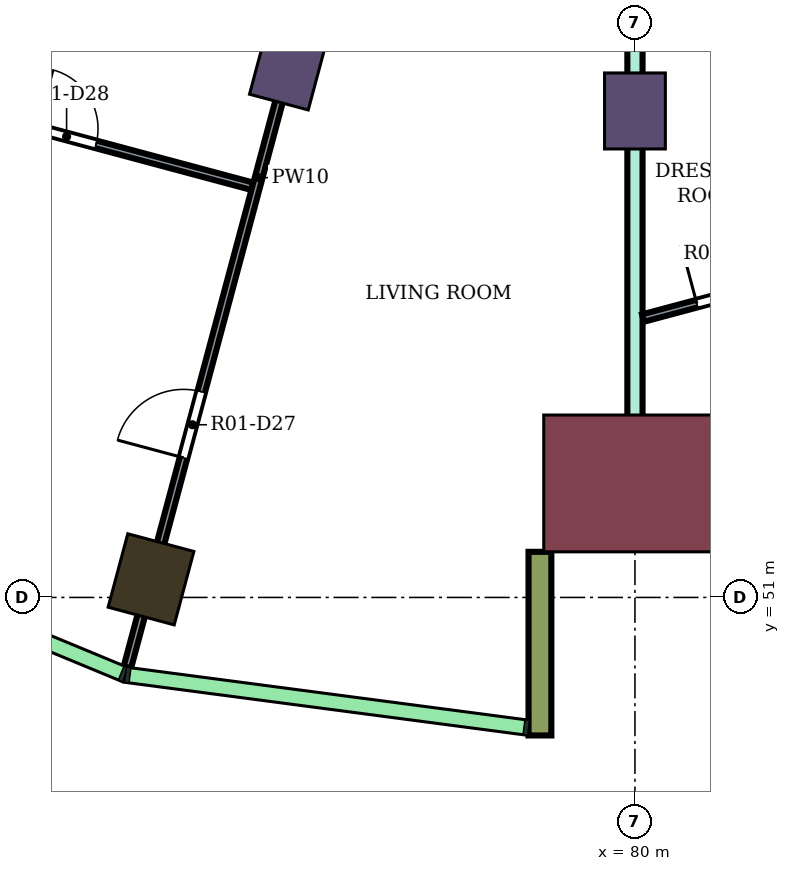
"""IFC4 building model, lengths in metres.
Left out: names, types, materials, properties, quantities, classifications, styles, units other than length and angle.
Written with IfcOpenShell. Run it as: python <this file> out.ifc"""

import sys

from ifc_helpers import new_model, si_unit, direction, frame, frame_2d, origin, origin_2d, place, context, subcontext, project, spatial, rectangle, extrude, element, fill, save


model = new_model("IFC4")
c1 = context("Model", 3, precision=1e-05, world=origin(), true_north=direction((0.0, 1.0)))
c2 = subcontext(c1, "Body", "Model", "MODEL_VIEW")
j1 = project(units=[si_unit("LENGTHUNIT", "METRE"), si_unit("PLANEANGLEUNIT", "RADIAN")], contexts=[c1])
p1 = place(None, origin())
s1 = spatial("IfcSite", under=j1, at=p1, CompositionType="ELEMENT")
p2 = place(p1, origin())
s2 = spatial("IfcBuilding", under=s1, at=p2, CompositionType="ELEMENT")
p3 = place(p2, frame((0.0, 0.0, 157.7)))
s3 = spatial("IfcBuildingStorey", under=s2, at=p3, CompositionType="ELEMENT", Elevation=157.7)
p4 = place(p3, frame((73.633, 51.238, 0.0), z_axis=(0.0, 0.0, 1.0), x_axis=(-0.258819045103, -0.965925826289, 0.0)))
e1 = element("IfcColumn", 1, at=p4, inside=s3, PredefinedType="COLUMN", context=c2, shape_type="SweptSolid", body=[
    extrude(rectangle(XDim=1.0, YDim=0.9, at=origin_2d()), origin(), (0.0, 0.0, 1.0), 4.1),
])
for number, where, z_axis, x_axis in (
    (2, (75.445, 58.0, 0.0), (0.0, 0.0, 1.0), (-0.259, -0.966, 0.0)),
    (3, (80.0, 57.4, 0.0), (0.0, 0.0, 1.0), (0.0, -1.0, 0.0)),
):
    element("IfcColumn", number, at=place(p3, frame(where, z_axis=z_axis, x_axis=x_axis)), inside=s3, PredefinedType="COLUMN", context=c2, shape_type="SweptSolid", body=[
        extrude(rectangle(XDim=1.0, YDim=0.8, at=origin_2d()), origin(), (0.0, 0.0, 1.0), 4.1),
    ])
p5 = place(p3, frame((80.0, 52.5, 0.0), z_axis=(0.0, 0.0, 1.0), x_axis=(0.0, -1.0, 0.0)))
e4 = element("IfcColumn", 4, at=p5, inside=s3, PredefinedType="COLUMN", context=c2, shape_type="SweptSolid", body=[
    extrude(rectangle(XDim=1.8, YDim=2.4, at=origin_2d()), origin(), (0.0, 0.0, 1.0), 4.1),
])
p6 = place(p3, frame((78.75, 51.6, 0.0), z_axis=(0.0, 0.0, 1.0), x_axis=(0.0, -1.0, 0.0)))
e5 = element("IfcWall", 5, at=p6, inside=s3, PredefinedType="NOTDEFINED", context=c2, shape_type="SweptSolid", body=[
    extrude(rectangle(XDim=2.416, YDim=0.3, at=frame_2d((1.208, 0.0))), origin(), (0.0, 0.0, 1.0), 4.1),
])
p7 = place(p3, frame((80.0, 51.8, 0.0), z_axis=(0.0, 0.0, 1.0), x_axis=(0.0, 1.0, 0.0)))
e6 = element("IfcWall", 6, at=p7, inside=s3, PredefinedType="PARTITIONING", context=c2, shape_type="SweptSolid", body=[
    extrude(rectangle(XDim=10.314, YDim=0.2, at=frame_2d((5.157, 0.0))), origin(), (0.0, 0.0, 1.0), 3.65),
])
p8 = place(p3, frame((67.101, 52.659, 0.0), z_axis=(0.0, 0.0, 1.0), x_axis=(0.499985055897, 0.866034031594, 0.0)))
e7 = element("IfcWall", 7, at=p8, inside=s3, PredefinedType="PARTITIONING", context=c2, shape_type="SweptSolid", body=[
    extrude(rectangle(XDim=12.876, YDim=0.1, at=frame_2d((6.438, 0.0))), origin(), (0.0, 0.0, 1.0), 3.65),
])
p9 = place(p8, frame((2.504, 0.0, 0.0)))
e8 = element("IfcOpeningElement", 8, at=p9, cuts=e7, PredefinedType="OPENING", context=c2, shape_type="SweptSolid", body=[
    extrude(rectangle(XDim=0.9, YDim=2.1, at=frame_2d((0.45, 1.05))), frame((0.0, 0.06, 0.0), z_axis=(0.0, -1.0, 0.0), x_axis=(1.0, 0.0, 0.0)), (0.0, 0.0, 1.0), 0.12),
])
p10 = place(p3, frame((70.088, 57.717, 0.0), z_axis=(0.0, 0.0, 1.0), x_axis=(0.965906836082, -0.258889907124, 0.0)))
e9 = element("IfcWall", 9, at=p10, inside=s3, PredefinedType="PARTITIONING", context=c2, shape_type="SweptSolid", body=[
    extrude(rectangle(XDim=5.051, YDim=0.1, at=frame_2d((2.525, 0.0))), origin(), (0.0, 0.0, 1.0), 3.65),
])
p11 = place(p10, frame((2.121, 0.0, 0.0)))
e10 = element("IfcOpeningElement", 10, at=p11, cuts=e9, PredefinedType="OPENING", context=c2, shape_type="SweptSolid", body=[
    extrude(rectangle(XDim=0.8, YDim=2.1, at=frame_2d((0.4, 1.05))), frame((0.0, 0.06, 0.0), z_axis=(0.0, -1.0, 0.0), x_axis=(1.0, 0.0, 0.0)), (0.0, 0.0, 1.0), 0.12),
])
p12 = place(p3, frame((73.322, 50.081, 0.0), z_axis=(0.0, 0.0, 1.0), x_axis=(0.258982801816, 0.965881932931, 0.0)))
e11 = element("IfcWall", 11, at=p12, inside=s3, PredefinedType="PARTITIONING", context=c2, shape_type="SweptSolid", body=[
    extrude(rectangle(XDim=13.338, YDim=0.1, at=frame_2d((6.669, 0.0))), origin(), (0.0, 0.0, 1.0), 3.65),
])
p13 = place(p12, frame((2.854, 0.0, 0.0)))
e12 = element("IfcOpeningElement", 12, at=p13, cuts=e11, PredefinedType="OPENING", context=c2, shape_type="SweptSolid", body=[
    extrude(rectangle(XDim=0.9, YDim=2.1, at=frame_2d((0.45, 1.05))), frame((0.0, 0.06, 0.0), z_axis=(0.0, -1.0, 0.0), x_axis=(1.0, 0.0, 0.0)), (0.0, 0.0, 1.0), 0.12),
])
p14 = place(p12, frame((10.528, 0.0, 0.0)))
e13 = element("IfcOpeningElement", 13, at=p14, cuts=e11, PredefinedType="OPENING", context=c2, shape_type="SweptSolid", body=[
    extrude(rectangle(XDim=0.8, YDim=2.1, at=frame_2d((0.4, 1.05))), frame((0.0, 0.06, 0.0), z_axis=(0.0, -1.0, 0.0), x_axis=(1.0, 0.0, 0.0)), (0.0, 0.0, 1.0), 0.12),
])
p15 = place(p3, frame((80.106, 54.676, 0.0), z_axis=(0.0, 0.0, 1.0), x_axis=(0.965976901679, 0.258628353863, 0.0)))
e14 = element("IfcWall", 14, at=p15, inside=s3, PredefinedType="PARTITIONING", context=c2, shape_type="SweptSolid", body=[
    extrude(rectangle(XDim=5.097, YDim=0.1, at=frame_2d((2.549, 0.0))), origin(), (0.0, 0.0, 1.0), 3.65),
])
p16 = place(p15, frame((0.733, 0.0, 0.0)))
e15 = element("IfcOpeningElement", 15, at=p16, cuts=e14, PredefinedType="OPENING", context=c2, shape_type="SweptSolid", body=[
    extrude(rectangle(XDim=0.8, YDim=2.1, at=frame_2d((0.4, 1.05))), frame((0.0, 0.06, 0.0), z_axis=(0.0, -1.0, 0.0), x_axis=(1.0, 0.0, 0.0)), (0.0, 0.0, 1.0), 0.12),
])
p17 = place(p3, frame((80.519, 62.239, 0.0), z_axis=(0.0, 0.0, 1.0), x_axis=(0.25878046533, -0.965936162882, 0.0)))
e16 = element("IfcWall", 16, at=p17, inside=s3, PredefinedType="PARTITIONING", context=c2, shape_type="SweptSolid", body=[
    extrude(rectangle(XDim=7.149, YDim=0.1, at=frame_2d((3.575, 0.0))), origin(), (0.0, 0.0, 1.0), 3.65),
])
p18 = place(p16, origin())
e17 = element("IfcDoor", 17, at=p18, inside=s3, OperationType="SINGLE_SWING_LEFT", PredefinedType="DOOR", context=c2, shape_type="SweptSolid", body=[
    extrude(rectangle(XDim=0.8, YDim=2.1, at=frame_2d((0.4, 1.05))), frame((0.0, 0.025, 0.0), z_axis=(0.0, -1.0, 0.0), x_axis=(1.0, 0.0, 0.0)), (0.0, 0.0, 1.0), 0.05),
])
fill(e15, e17)
p19 = place(p13, origin())
e18 = element("IfcDoor", 18, at=p19, inside=s3, OperationType="SINGLE_SWING_LEFT", PredefinedType="DOOR", context=c2, shape_type="SweptSolid", body=[
    extrude(rectangle(XDim=0.9, YDim=2.1, at=frame_2d((0.45, 1.05))), frame((0.0, 0.025, 0.0), z_axis=(0.0, -1.0, 0.0), x_axis=(1.0, 0.0, 0.0)), (0.0, 0.0, 1.0), 0.05),
])
fill(e12, e18)
p20 = place(p11, origin())
e19 = element("IfcDoor", 19, at=p20, inside=s3, OperationType="SINGLE_SWING_LEFT", PredefinedType="DOOR", context=c2, shape_type="SweptSolid", body=[
    extrude(rectangle(XDim=0.8, YDim=2.1, at=frame_2d((0.4, 1.05))), frame((0.0, 0.025, 0.0), z_axis=(0.0, -1.0, 0.0), x_axis=(1.0, 0.0, 0.0)), (0.0, 0.0, 1.0), 0.05),
])
fill(e10, e19)
save(model, sys.argv[1])
